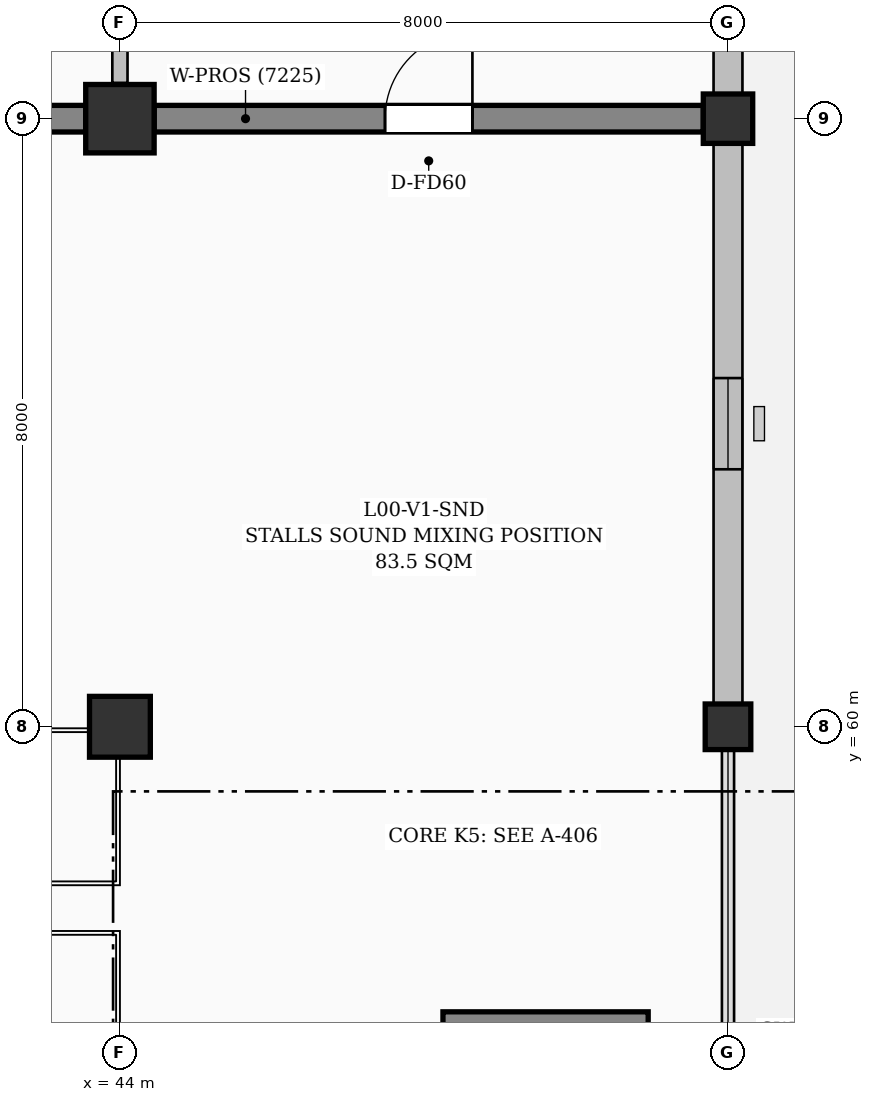
"""IFC4 building model, lengths in metres.
Left out: names, types, materials, properties, quantities, classifications, styles, units other than length and angle.
Written with IfcOpenShell. Run it as: python <this file> out.ifc"""

import sys

from ifc_helpers import new_model, si_unit, direction, frame, frame_2d, origin, origin_2d, place, context, subcontext, project, spatial, rectangle, extrude, element, fill, save


model = new_model("IFC4")
c1 = context("Model", 3, precision=1e-05, world=origin(), true_north=direction((0.0, 1.0)))
c2 = subcontext(c1, "Body", "Model", "MODEL_VIEW")
j1 = project(units=[si_unit("LENGTHUNIT", "METRE"), si_unit("PLANEANGLEUNIT", "RADIAN")], contexts=[c1])
p1 = place(None, origin())
s1 = spatial("IfcSite", under=j1, at=p1, CompositionType="ELEMENT")
p2 = place(p1, origin())
s2 = spatial("IfcBuilding", under=s1, at=p2, CompositionType="ELEMENT")
p3 = place(p2, origin())
s3 = spatial("IfcBuildingStorey", under=s2, at=p3, CompositionType="ELEMENT", Elevation=0.0)
p4 = place(p3, frame((44.0, 60.0, 0.0), z_axis=(0.0, 0.0, 1.0), x_axis=(1.0, 0.0, 0.0)))
e1 = element("IfcColumn", 1, at=p4, inside=s3, PredefinedType="COLUMN", context=c2, shape_type="SweptSolid", body=[
    extrude(rectangle(XDim=0.8, YDim=0.8, at=origin_2d()), origin(), (0.0, 0.0, 1.0), 4.8),
])
p5 = place(p3, frame((44.0, 68.0, 0.0), z_axis=(0.0, 0.0, 1.0), x_axis=(1.0, 0.0, 0.0)))
e2 = element("IfcColumn", 2, at=p5, inside=s3, PredefinedType="COLUMN", context=c2, shape_type="SweptSolid", body=[
    extrude(rectangle(XDim=0.9, YDim=0.9, at=origin_2d()), origin(), (0.0, 0.0, 1.0), 4.8),
])
p6 = place(p3, frame((52.0, 60.0, 0.0), z_axis=(0.0, 0.0, 1.0), x_axis=(1.0, 0.0, 0.0)))
e3 = element("IfcColumn", 3, at=p6, inside=s3, PredefinedType="COLUMN", context=c2, shape_type="SweptSolid", body=[
    extrude(rectangle(XDim=0.6, YDim=0.6, at=origin_2d()), origin(), (0.0, 0.0, 1.0), 4.8),
])
p7 = place(p3, frame((52.0, 68.0, 0.0), z_axis=(0.0, 0.0, 1.0), x_axis=(1.0, 0.0, 0.0)))
e4 = element("IfcColumn", 4, at=p7, inside=s3, PredefinedType="COLUMN", context=c2, shape_type="SweptSolid", body=[
    extrude(rectangle(XDim=0.65, YDim=0.65, at=origin_2d()), origin(), (0.0, 0.0, 1.0), 4.8),
])
p8 = place(p3, frame((36.45, 68.0, 0.0), z_axis=(0.0, 0.0, 1.0), x_axis=(1.0, 0.0, 0.0)))
e5 = element("IfcWall", 5, at=p8, inside=s3, PredefinedType="SHEAR", context=c2, shape_type="SweptSolid", body=[
    extrude(rectangle(XDim=7.1, YDim=0.35, at=frame_2d((3.55, 0.0))), origin(), (0.0, 0.0, 1.0), 4.55),
])
p9 = place(p3, frame((44.45, 68.0, 0.0), z_axis=(0.0, 0.0, 1.0), x_axis=(1.0, 0.0, 0.0)))
e6 = element("IfcWall", 6, at=p9, inside=s3, PredefinedType="SHEAR", context=c2, shape_type="SweptSolid", body=[
    extrude(rectangle(XDim=7.225, YDim=0.35, at=frame_2d((3.613, 0.0))), origin(), (0.0, 0.0, 1.0), 4.55),
])
p10 = place(p9, frame((3.038, 0.0, 0.0)))
e7 = element("IfcOpeningElement", 7, at=p10, cuts=e6, PredefinedType="OPENING", context=c2, shape_type="SweptSolid", body=[
    extrude(rectangle(XDim=1.15, YDim=2.15, at=frame_2d((0.575, 1.075))), frame((0.0, 0.185, 0.0), z_axis=(0.0, -1.0, 0.0), x_axis=(1.0, 0.0, 0.0)), (0.0, 0.0, 1.0), 0.37),
])
p11 = place(p3, frame((52.0, 67.675, 0.0), z_axis=(0.0, 0.0, 1.0), x_axis=(0.0, -1.0, 0.0)))
e8 = element("IfcWall", 8, at=p11, inside=s3, PredefinedType="SOLIDWALL", context=c2, shape_type="SweptSolid", body=[
    extrude(rectangle(XDim=7.375, YDim=0.38, at=frame_2d((3.688, 0.0))), origin(), (0.0, 0.0, 1.0), 4.235),
])
p12 = place(p11, frame((3.087, 0.0, 0.95)))
e9 = element("IfcOpeningElement", 9, at=p12, cuts=e8, PredefinedType="OPENING", context=c2, shape_type="SweptSolid", body=[
    extrude(rectangle(XDim=1.2, YDim=1.5, at=frame_2d((0.6, 0.75))), frame((0.0, 0.2, 0.0), z_axis=(0.0, -1.0, 0.0), x_axis=(1.0, 0.0, 0.0)), (0.0, 0.0, 1.0), 0.4),
])
p13 = place(p3, frame((52.0, 75.675, 0.0), z_axis=(0.0, 0.0, 1.0), x_axis=(0.0, -1.0, 0.0)))
e10 = element("IfcWall", 10, at=p13, inside=s3, PredefinedType="SOLIDWALL", context=c2, shape_type="SweptSolid", body=[
    extrude(rectangle(XDim=7.35, YDim=0.38, at=frame_2d((3.675, 0.0))), origin(), (0.0, 0.0, 1.0), 3.935),
])
p14 = place(p3, frame((50.95, 56.1, 0.0), z_axis=(0.0, 0.0, 1.0), x_axis=(-1.0, 0.0, 0.0)))
e11 = element("IfcWall", 11, at=p14, inside=s3, PredefinedType="SHEAR", context=c2, shape_type="SweptSolid", body=[
    extrude(rectangle(XDim=2.7, YDim=0.3, at=frame_2d((1.35, 0.0))), origin(), (0.0, 0.0, 1.0), 4.55),
])
p15 = place(p3, frame((44.0, 68.47, 0.0), z_axis=(0.0, 0.0, 1.0), x_axis=(0.0, 1.0, 0.0)))
e12 = element("IfcWall", 12, at=p15, inside=s3, PredefinedType="PARTITIONING", context=c2, shape_type="SweptSolid", body=[
    extrude(rectangle(XDim=9.41, YDim=0.2, at=frame_2d((4.705, 0.0))), origin(), (0.0, 0.0, 1.0), 3.635),
])
p16 = place(p15, frame((3.805, 0.0, 0.0)))
e13 = element("IfcOpeningElement", 13, at=p16, cuts=e12, PredefinedType="OPENING", context=c2, shape_type="SweptSolid", body=[
    extrude(rectangle(XDim=1.8, YDim=2.35, at=frame_2d((0.9, 1.175))), frame((0.0, 0.11, 0.0), z_axis=(0.0, -1.0, 0.0), x_axis=(1.0, 0.0, 0.0)), (0.0, 0.0, 1.0), 0.22),
])
p17 = place(p12, origin())
e14 = element("IfcWindow", 14, at=p17, inside=s3, PartitioningType="SINGLE_PANEL", PredefinedType="WINDOW", context=c2, shape_type="SweptSolid", body=[
    extrude(rectangle(XDim=1.2, YDim=1.5, at=frame_2d((0.6, 0.75))), frame((0.0, 0.03, 0.0), z_axis=(0.0, -1.0, 0.0), x_axis=(1.0, 0.0, 0.0)), (0.0, 0.0, 1.0), 0.06),
])
fill(e9, e14)
p18 = place(p10, origin())
e15 = element("IfcDoor", 15, at=p18, inside=s3, OperationType="SINGLE_SWING_RIGHT", PredefinedType="DOOR", context=c2, shape_type="SweptSolid", body=[
    extrude(rectangle(XDim=1.15, YDim=2.15, at=frame_2d((0.575, 1.075))), frame((0.0, 0.025, 0.0), z_axis=(0.0, -1.0, 0.0), x_axis=(1.0, 0.0, 0.0)), (0.0, 0.0, 1.0), 0.05),
])
fill(e7, e15)
save(model, sys.argv[1])
